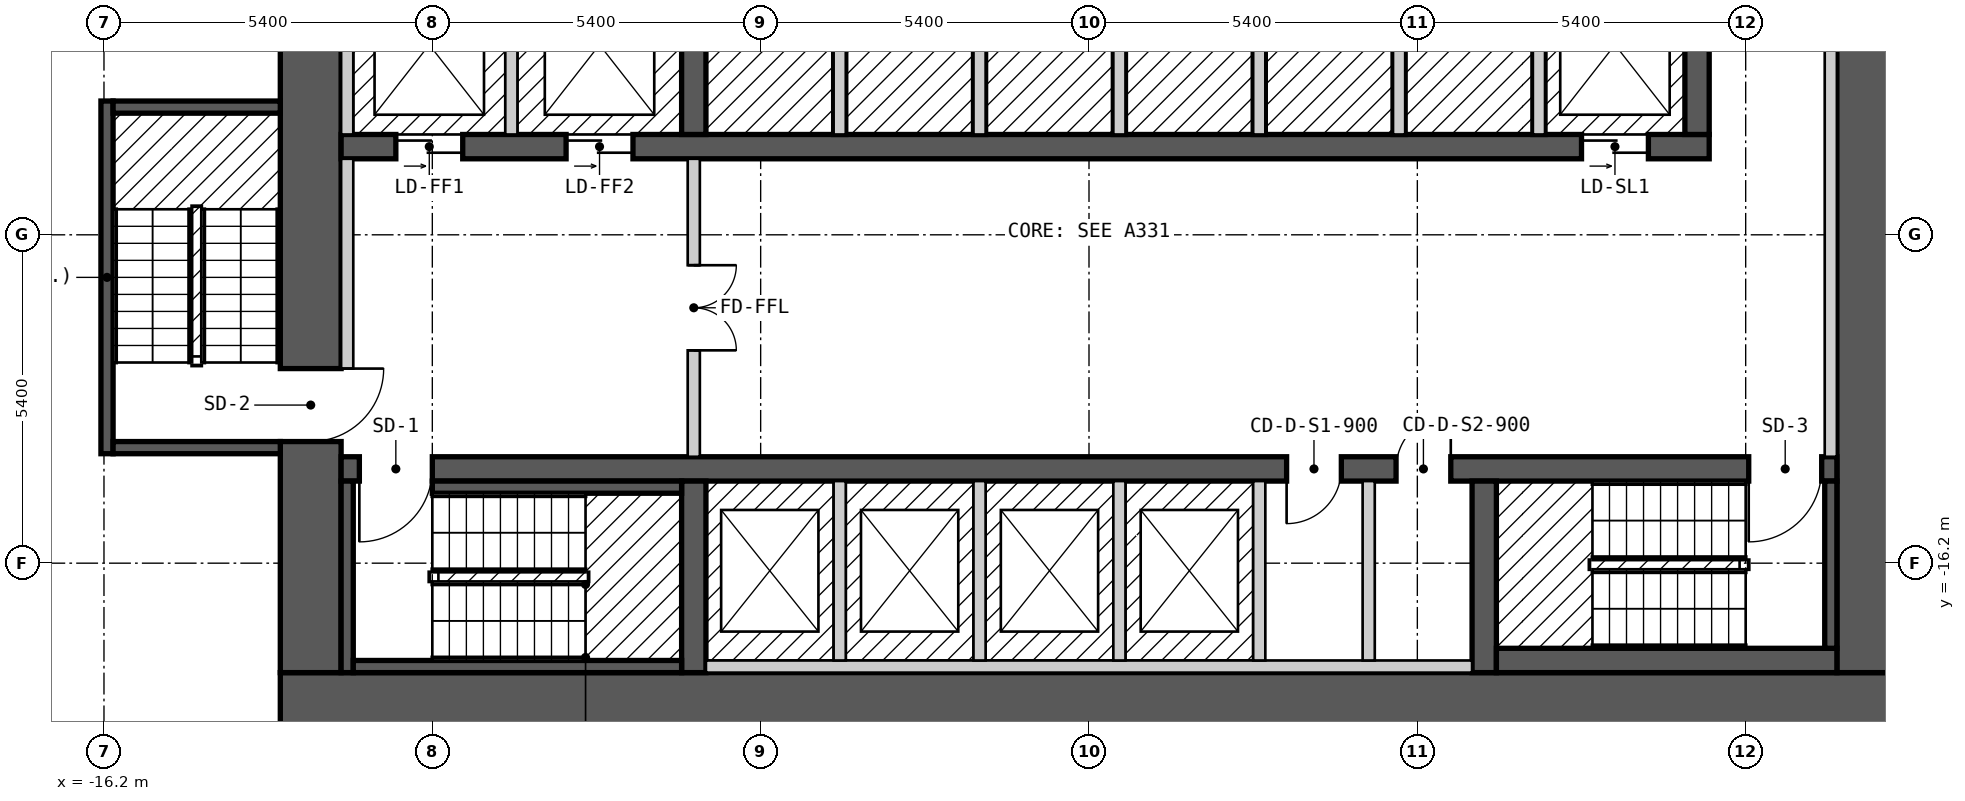
"""IFC4 building model, lengths in metres.
Left out: names, types, materials, properties, quantities, classifications, styles, units other than length and angle.
Written with IfcOpenShell. Run it as: python <this file> out.ifc"""

import sys

from ifc_helpers import new_model, si_unit, direction, frame, frame_2d, origin, place, context, subcontext, project, spatial, rectangle, extrude, element, fill, save


model = new_model("IFC4")
c1 = context("Model", 3, precision=1e-05, world=origin(), true_north=direction((0.0, 1.0)))
c2 = subcontext(c1, "Body", "Model", "MODEL_VIEW")
j1 = project(units=[si_unit("LENGTHUNIT", "METRE"), si_unit("PLANEANGLEUNIT", "RADIAN")], contexts=[c1])
p1 = place(None, origin())
s1 = spatial("IfcSite", under=j1, at=p1, CompositionType="ELEMENT")
p2 = place(p1, origin())
s2 = spatial("IfcBuilding", under=s1, at=p2, CompositionType="ELEMENT")
p3 = place(p2, frame((0.0, 0.0, 108.0)))
s3 = spatial("IfcBuildingStorey", under=s2, at=p3, CompositionType="ELEMENT", Elevation=108.0)
p4 = place(p3, frame((-13.3, -18.5, 0.0), z_axis=(0.0, 0.0, 1.0), x_axis=(1.0, 0.0, 0.0)))
e1 = element("IfcWall", 1, at=p4, inside=s3, PredefinedType="SHEAR", context=c2, shape_type="SweptSolid", body=[
    extrude(rectangle(XDim=26.6, YDim=1.0, at=frame_2d((13.3, 0.0))), origin(), (0.0, 0.0, 1.0), 2.6),
])
p5 = place(p3, frame((-12.8, -18.0, 0.0), z_axis=(0.0, 0.0, 1.0), x_axis=(0.0, 1.0, 0.0)))
e2 = element("IfcWall", 2, at=p5, inside=s3, PredefinedType="SHEAR", context=c2, shape_type="SweptSolid", body=[
    extrude(rectangle(XDim=12.0, YDim=1.0, at=frame_2d((6.0, 0.0))), origin(), (0.0, 0.0, 1.0), 2.6),
])
p6 = place(p5, frame((3.8, 0.0, 0.0)))
e3 = element("IfcOpeningElement", 3, at=p6, cuts=e2, PredefinedType="OPENING", context=c2, shape_type="SweptSolid", body=[
    extrude(rectangle(XDim=1.2, YDim=2.1, at=frame_2d((0.6, 1.05))), frame((0.0, 0.51, 0.0), z_axis=(0.0, -1.0, 0.0), x_axis=(1.0, 0.0, 0.0)), (0.0, 0.0, 1.0), 1.02),
])
p7 = place(p3, frame((12.8, -18.0, 0.0), z_axis=(0.0, 0.0, 1.0), x_axis=(0.0, 1.0, 0.0)))
e4 = element("IfcWall", 4, at=p7, inside=s3, PredefinedType="SHEAR", context=c2, shape_type="SweptSolid", body=[
    extrude(rectangle(XDim=12.0, YDim=1.0, at=frame_2d((6.0, 0.0))), origin(), (0.0, 0.0, 1.0), 2.6),
])
p8 = place(p3, frame((-12.3, -14.65, 0.0), z_axis=(0.0, 0.0, 1.0), x_axis=(1.0, 0.0, 0.0)))
e5 = element("IfcWall", 5, at=p8, inside=s3, PredefinedType="SHEAR", context=c2, shape_type="SweptSolid", body=[
    extrude(rectangle(XDim=24.6, YDim=0.4, at=frame_2d((12.3, 0.0))), origin(), (0.0, 0.0, 1.0), 2.6),
])
p9 = place(p8, frame((1.5, 0.0, 0.0), z_axis=(0.0, 0.0, 1.0), x_axis=(-1.0, 0.0, 0.0)))
e6 = element("IfcOpeningElement", 6, at=p9, cuts=e5, PredefinedType="OPENING", context=c2, shape_type="SweptSolid", body=[
    extrude(rectangle(XDim=1.2, YDim=2.1, at=frame_2d((0.6, 1.05))), frame((0.0, 0.21, 0.0), z_axis=(0.0, -1.0, 0.0), x_axis=(1.0, 0.0, 0.0)), (0.0, 0.0, 1.0), 0.42),
])
p10 = place(p8, frame((24.35, 0.0, 0.0), z_axis=(0.0, 0.0, 1.0), x_axis=(-1.0, 0.0, 0.0)))
e7 = element("IfcOpeningElement", 7, at=p10, cuts=e5, PredefinedType="OPENING", context=c2, shape_type="SweptSolid", body=[
    extrude(rectangle(XDim=1.2, YDim=2.1, at=frame_2d((0.6, 1.05))), frame((0.0, 0.21, 0.0), z_axis=(0.0, -1.0, 0.0), x_axis=(1.0, 0.0, 0.0)), (0.0, 0.0, 1.0), 0.42),
])
p11 = place(p8, frame((16.45, 0.0, 0.0), z_axis=(0.0, 0.0, 1.0), x_axis=(-1.0, 0.0, 0.0)))
e8 = element("IfcOpeningElement", 8, at=p11, cuts=e5, PredefinedType="OPENING", context=c2, shape_type="SweptSolid", body=[
    extrude(rectangle(XDim=0.9, YDim=2.1, at=frame_2d((0.45, 1.05))), frame((0.0, 0.21, 0.0), z_axis=(0.0, -1.0, 0.0), x_axis=(1.0, 0.0, 0.0)), (0.0, 0.0, 1.0), 0.42),
])
p12 = place(p8, frame((18.25, 0.0, 0.0), z_axis=(0.0, 0.0, 1.0), x_axis=(-1.0, 0.0, 0.0)))
e9 = element("IfcOpeningElement", 9, at=p12, cuts=e5, PredefinedType="OPENING", context=c2, shape_type="SweptSolid", body=[
    extrude(rectangle(XDim=0.9, YDim=2.1, at=frame_2d((0.45, 1.05))), frame((0.0, 0.21, 0.0), z_axis=(0.0, -1.0, 0.0), x_axis=(1.0, 0.0, 0.0)), (0.0, 0.0, 1.0), 0.42),
])
p13 = place(p3, frame((-12.3, -9.35, 0.0), z_axis=(0.0, 0.0, 1.0), x_axis=(1.0, 0.0, 0.0)))
e10 = element("IfcWall", 10, at=p13, inside=s3, PredefinedType="SHEAR", context=c2, shape_type="SweptSolid", body=[
    extrude(rectangle(XDim=22.5, YDim=0.4, at=frame_2d((11.25, 0.0))), origin(), (0.0, 0.0, 1.0), 2.6),
])
p14 = place(p13, frame((0.9, 0.0, 0.0)))
e11 = element("IfcOpeningElement", 11, at=p14, cuts=e10, PredefinedType="OPENING", context=c2, shape_type="SweptSolid", body=[
    extrude(rectangle(XDim=1.1, YDim=2.1, at=frame_2d((0.55, 1.05))), frame((0.0, 0.21, 0.0), z_axis=(0.0, -1.0, 0.0), x_axis=(1.0, 0.0, 0.0)), (0.0, 0.0, 1.0), 0.42),
])
p15 = place(p13, frame((3.7, 0.0, 0.0)))
e12 = element("IfcOpeningElement", 12, at=p15, cuts=e10, PredefinedType="OPENING", context=c2, shape_type="SweptSolid", body=[
    extrude(rectangle(XDim=1.1, YDim=2.1, at=frame_2d((0.55, 1.05))), frame((0.0, 0.21, 0.0), z_axis=(0.0, -1.0, 0.0), x_axis=(1.0, 0.0, 0.0)), (0.0, 0.0, 1.0), 0.42),
])
p16 = place(p13, frame((20.4, 0.0, 0.0)))
e13 = element("IfcOpeningElement", 13, at=p16, cuts=e10, PredefinedType="OPENING", context=c2, shape_type="SweptSolid", body=[
    extrude(rectangle(XDim=1.1, YDim=2.1, at=frame_2d((0.55, 1.05))), frame((0.0, 0.21, 0.0), z_axis=(0.0, -1.0, 0.0), x_axis=(1.0, 0.0, 0.0)), (0.0, 0.0, 1.0), 0.42),
])
for number, where, z_axis, x_axis in (
    (14, (-6.5, -18.0, 0.0), (0.0, 0.0, 1.0), (0.0, 1.0, 0.0)),
    (15, (6.5, -18.0, 0.0), (0.0, 0.0, 1.0), (0.0, 1.0, 0.0)),
    (16, (-6.5, -9.15, 0.0), (0.0, 0.0, 1.0), (0.0, 1.0, 0.0)),
    (17, (10.0, -9.15, 0.0), (0.0, 0.0, 1.0), (0.0, 1.0, 0.0)),
):
    element("IfcWall", number, at=place(p3, frame(where, z_axis=z_axis, x_axis=x_axis)), inside=s3, PredefinedType="SHEAR", context=c2, shape_type="SweptSolid", body=[
        extrude(rectangle(XDim=3.15, YDim=0.4, at=frame_2d((1.575, 0.0))), origin(), (0.0, 0.0, 1.0), 2.6),
    ])
p17 = place(p3, frame((-16.15, -14.4, 0.0), z_axis=(0.0, 0.0, 1.0), x_axis=(0.0, 1.0, 0.0)))
e18 = element("IfcWall", 18, at=p17, inside=s3, PredefinedType="SOLIDWALL", context=c2, shape_type="SweptSolid", body=[
    extrude(rectangle(XDim=5.8, YDim=0.2, at=frame_2d((2.9, 0.0))), origin(), (0.0, 0.0, 1.0), 2.6),
])
for number, where, z_axis, x_axis in (
    (19, (-16.05, -14.3, 0.0), (0.0, 0.0, 1.0), (1.0, 0.0, 0.0)),
    (20, (-16.05, -8.7, 0.0), (0.0, 0.0, 1.0), (1.0, 0.0, 0.0)),
):
    element("IfcWall", number, at=place(p3, frame(where, z_axis=z_axis, x_axis=x_axis)), inside=s3, PredefinedType="SOLIDWALL", context=c2, shape_type="SweptSolid", body=[
        extrude(rectangle(XDim=2.75, YDim=0.2, at=frame_2d((1.375, 0.0))), origin(), (0.0, 0.0, 1.0), 2.6),
    ])
p18 = place(p3, frame((-12.2, -18.0, 0.0), z_axis=(0.0, 0.0, 1.0), x_axis=(0.0, 1.0, 0.0)))
e21 = element("IfcWall", 21, at=p18, inside=s3, PredefinedType="SOLIDWALL", context=c2, shape_type="SweptSolid", body=[
    extrude(rectangle(XDim=3.15, YDim=0.2, at=frame_2d((1.575, 0.0))), origin(), (0.0, 0.0, 1.0), 2.6),
])
p19 = place(p3, frame((-12.2, -13.0, 0.0), z_axis=(0.0, 0.0, 1.0), x_axis=(0.0, 1.0, 0.0)))
e22 = element("IfcWall", 22, at=p19, inside=s3, PredefinedType="PARTITIONING", context=c2, shape_type="SweptSolid", body=[
    extrude(rectangle(XDim=3.45, YDim=0.2, at=frame_2d((1.725, 0.0))), origin(), (0.0, 0.0, 1.0), 2.6),
])
p20 = place(p3, frame((-12.2, -9.15, 0.0), z_axis=(0.0, 0.0, 1.0), x_axis=(0.0, 1.0, 0.0)))
e23 = element("IfcWall", 23, at=p20, inside=s3, PredefinedType="SOLIDWALL", context=c2, shape_type="SweptSolid", body=[
    extrude(rectangle(XDim=3.15, YDim=0.2, at=frame_2d((1.575, 0.0))), origin(), (0.0, 0.0, 1.0), 2.6),
])
p21 = place(p3, frame((-12.1, -17.9, 0.0), z_axis=(0.0, 0.0, 1.0), x_axis=(1.0, 0.0, 0.0)))
e24 = element("IfcWall", 24, at=p21, inside=s3, PredefinedType="SOLIDWALL", context=c2, shape_type="SweptSolid", body=[
    extrude(rectangle(XDim=5.4, YDim=0.2, at=frame_2d((2.7, 0.0))), origin(), (0.0, 0.0, 1.0), 2.6),
])
p22 = place(p3, frame((-10.8, -14.95, 0.0), z_axis=(0.0, 0.0, 1.0), x_axis=(1.0, 0.0, 0.0)))
e25 = element("IfcWall", 25, at=p22, inside=s3, PredefinedType="SOLIDWALL", context=c2, shape_type="SweptSolid", body=[
    extrude(rectangle(XDim=4.1, YDim=0.2, at=frame_2d((2.05, 0.0))), origin(), (0.0, 0.0, 1.0), 2.6),
])
p23 = place(p3, frame((-9.5, -9.15, 0.0), z_axis=(0.0, 0.0, 1.0), x_axis=(0.0, 1.0, 0.0)))
e26 = element("IfcWall", 26, at=p23, inside=s3, PredefinedType="SOLIDWALL", context=c2, shape_type="SweptSolid", body=[
    extrude(rectangle(XDim=2.95, YDim=0.2, at=frame_2d((1.475, 0.0))), origin(), (0.0, 0.0, 1.0), 2.6),
])
p24 = place(p3, frame((-6.5, -14.45, 0.0), z_axis=(0.0, 0.0, 1.0), x_axis=(0.0, 1.0, 0.0)))
e27 = element("IfcWall", 27, at=p24, inside=s3, PredefinedType="PARTITIONING", context=c2, shape_type="SweptSolid", body=[
    extrude(rectangle(XDim=4.9, YDim=0.2, at=frame_2d((2.45, 0.0))), origin(), (0.0, 0.0, 1.0), 2.6),
])
p25 = place(p24, frame((3.15, 0.0, 0.0), z_axis=(0.0, 0.0, 1.0), x_axis=(-1.0, 0.0, 0.0)))
e28 = element("IfcOpeningElement", 28, at=p25, cuts=e27, PredefinedType="OPENING", context=c2, shape_type="SweptSolid", body=[
    extrude(rectangle(XDim=1.4, YDim=2.1, at=frame_2d((0.7, 1.05))), frame((0.0, 0.11, 0.0), z_axis=(0.0, -1.0, 0.0), x_axis=(1.0, 0.0, 0.0)), (0.0, 0.0, 1.0), 0.22),
])
p26 = place(p3, frame((-6.3, -17.9, 0.0), z_axis=(0.0, 0.0, 1.0), x_axis=(1.0, 0.0, 0.0)))
e29 = element("IfcWall", 29, at=p26, inside=s3, PredefinedType="SOLIDWALL", context=c2, shape_type="SweptSolid", body=[
    extrude(rectangle(XDim=12.6, YDim=0.2, at=frame_2d((6.3, 0.0))), origin(), (0.0, 0.0, 1.0), 2.6),
])
p27 = place(p3, frame((-4.1, -17.8, 0.0), z_axis=(0.0, 0.0, 1.0), x_axis=(0.0, 1.0, 0.0)))
e30 = element("IfcWall", 30, at=p27, inside=s3, PredefinedType="SOLIDWALL", context=c2, shape_type="SweptSolid", body=[
    extrude(rectangle(XDim=2.95, YDim=0.2, at=frame_2d((1.475, 0.0))), origin(), (0.0, 0.0, 1.0), 2.6),
])
p28 = place(p3, frame((-4.1, -9.15, 0.0), z_axis=(0.0, 0.0, 1.0), x_axis=(0.0, 1.0, 0.0)))
e31 = element("IfcWall", 31, at=p28, inside=s3, PredefinedType="SOLIDWALL", context=c2, shape_type="SweptSolid", body=[
    extrude(rectangle(XDim=2.95, YDim=0.2, at=frame_2d((1.475, 0.0))), origin(), (0.0, 0.0, 1.0), 1.4),
])
p29 = place(p3, frame((-4.1, -9.15, 1.7), z_axis=(0.0, 0.0, 1.0), x_axis=(0.0, 1.0, 0.0)))
e32 = element("IfcWall", 32, at=p29, inside=s3, PredefinedType="SOLIDWALL", context=c2, shape_type="SweptSolid", body=[
    extrude(rectangle(XDim=2.95, YDim=0.2, at=frame_2d((1.475, 0.0))), origin(), (0.0, 0.0, 1.0), 0.9),
])
p30 = place(p3, frame((-1.8, -17.8, 0.0), z_axis=(0.0, 0.0, 1.0), x_axis=(0.0, 1.0, 0.0)))
e33 = element("IfcWall", 33, at=p30, inside=s3, PredefinedType="SOLIDWALL", context=c2, shape_type="SweptSolid", body=[
    extrude(rectangle(XDim=2.95, YDim=0.2, at=frame_2d((1.475, 0.0))), origin(), (0.0, 0.0, 1.0), 2.6),
])
p31 = place(p3, frame((-1.8, -9.15, 0.0), z_axis=(0.0, 0.0, 1.0), x_axis=(0.0, 1.0, 0.0)))
e34 = element("IfcWall", 34, at=p31, inside=s3, PredefinedType="SOLIDWALL", context=c2, shape_type="SweptSolid", body=[
    extrude(rectangle(XDim=2.95, YDim=0.2, at=frame_2d((1.475, 0.0))), origin(), (0.0, 0.0, 1.0), 1.4),
])
p32 = place(p3, frame((-1.8, -9.15, 1.7), z_axis=(0.0, 0.0, 1.0), x_axis=(0.0, 1.0, 0.0)))
e35 = element("IfcWall", 35, at=p32, inside=s3, PredefinedType="SOLIDWALL", context=c2, shape_type="SweptSolid", body=[
    extrude(rectangle(XDim=2.95, YDim=0.2, at=frame_2d((1.475, 0.0))), origin(), (0.0, 0.0, 1.0), 0.9),
])
p33 = place(p3, frame((0.5, -17.8, 0.0), z_axis=(0.0, 0.0, 1.0), x_axis=(0.0, 1.0, 0.0)))
e36 = element("IfcWall", 36, at=p33, inside=s3, PredefinedType="SOLIDWALL", context=c2, shape_type="SweptSolid", body=[
    extrude(rectangle(XDim=2.95, YDim=0.2, at=frame_2d((1.475, 0.0))), origin(), (0.0, 0.0, 1.0), 2.6),
])
p34 = place(p3, frame((0.5, -9.15, 0.0), z_axis=(0.0, 0.0, 1.0), x_axis=(0.0, 1.0, 0.0)))
e37 = element("IfcWall", 37, at=p34, inside=s3, PredefinedType="SOLIDWALL", context=c2, shape_type="SweptSolid", body=[
    extrude(rectangle(XDim=2.95, YDim=0.2, at=frame_2d((1.475, 0.0))), origin(), (0.0, 0.0, 1.0), 1.4),
])
p35 = place(p3, frame((0.5, -9.15, 1.7), z_axis=(0.0, 0.0, 1.0), x_axis=(0.0, 1.0, 0.0)))
e38 = element("IfcWall", 38, at=p35, inside=s3, PredefinedType="SOLIDWALL", context=c2, shape_type="SweptSolid", body=[
    extrude(rectangle(XDim=2.95, YDim=0.2, at=frame_2d((1.475, 0.0))), origin(), (0.0, 0.0, 1.0), 0.9),
])
p36 = place(p3, frame((2.8, -17.8, 0.0), z_axis=(0.0, 0.0, 1.0), x_axis=(0.0, 1.0, 0.0)))
e39 = element("IfcWall", 39, at=p36, inside=s3, PredefinedType="SOLIDWALL", context=c2, shape_type="SweptSolid", body=[
    extrude(rectangle(XDim=2.95, YDim=0.2, at=frame_2d((1.475, 0.0))), origin(), (0.0, 0.0, 1.0), 2.6),
])
p37 = place(p3, frame((2.8, -9.15, 0.0), z_axis=(0.0, 0.0, 1.0), x_axis=(0.0, 1.0, 0.0)))
e40 = element("IfcWall", 40, at=p37, inside=s3, PredefinedType="SOLIDWALL", context=c2, shape_type="SweptSolid", body=[
    extrude(rectangle(XDim=2.95, YDim=0.2, at=frame_2d((1.475, 0.0))), origin(), (0.0, 0.0, 1.0), 1.4),
])
p38 = place(p3, frame((2.8, -9.15, 1.7), z_axis=(0.0, 0.0, 1.0), x_axis=(0.0, 1.0, 0.0)))
e41 = element("IfcWall", 41, at=p38, inside=s3, PredefinedType="SOLIDWALL", context=c2, shape_type="SweptSolid", body=[
    extrude(rectangle(XDim=2.95, YDim=0.2, at=frame_2d((1.475, 0.0))), origin(), (0.0, 0.0, 1.0), 0.9),
])
p39 = place(p3, frame((4.6, -17.8, 0.0), z_axis=(0.0, 0.0, 1.0), x_axis=(0.0, 1.0, 0.0)))
e42 = element("IfcWall", 42, at=p39, inside=s3, PredefinedType="PARTITIONING", context=c2, shape_type="SweptSolid", body=[
    extrude(rectangle(XDim=2.95, YDim=0.2, at=frame_2d((1.475, 0.0))), origin(), (0.0, 0.0, 1.0), 2.6),
])
p40 = place(p3, frame((5.1, -9.15, 0.0), z_axis=(0.0, 0.0, 1.0), x_axis=(0.0, 1.0, 0.0)))
e43 = element("IfcWall", 43, at=p40, inside=s3, PredefinedType="SOLIDWALL", context=c2, shape_type="SweptSolid", body=[
    extrude(rectangle(XDim=2.95, YDim=0.2, at=frame_2d((1.475, 0.0))), origin(), (0.0, 0.0, 1.0), 1.4),
])
p41 = place(p3, frame((5.1, -9.15, 1.7), z_axis=(0.0, 0.0, 1.0), x_axis=(0.0, 1.0, 0.0)))
e44 = element("IfcWall", 44, at=p41, inside=s3, PredefinedType="SOLIDWALL", context=c2, shape_type="SweptSolid", body=[
    extrude(rectangle(XDim=2.95, YDim=0.2, at=frame_2d((1.475, 0.0))), origin(), (0.0, 0.0, 1.0), 0.9),
])
p42 = place(p3, frame((6.7, -17.8, 0.0), z_axis=(0.0, 0.0, 1.0), x_axis=(1.0, 0.0, 0.0)))
e45 = element("IfcWall", 45, at=p42, inside=s3, PredefinedType="SOLIDWALL", context=c2, shape_type="SweptSolid", body=[
    extrude(rectangle(XDim=5.6, YDim=0.4, at=frame_2d((2.8, 0.0))), origin(), (0.0, 0.0, 1.0), 2.6),
])
p43 = place(p3, frame((7.4, -9.15, 0.0), z_axis=(0.0, 0.0, 1.0), x_axis=(0.0, 1.0, 0.0)))
e46 = element("IfcWall", 46, at=p43, inside=s3, PredefinedType="SOLIDWALL", context=c2, shape_type="SweptSolid", body=[
    extrude(rectangle(XDim=2.95, YDim=0.2, at=frame_2d((1.475, 0.0))), origin(), (0.0, 0.0, 1.0), 1.4),
])
p44 = place(p3, frame((7.4, -9.15, 1.7), z_axis=(0.0, 0.0, 1.0), x_axis=(0.0, 1.0, 0.0)))
e47 = element("IfcWall", 47, at=p44, inside=s3, PredefinedType="SOLIDWALL", context=c2, shape_type="SweptSolid", body=[
    extrude(rectangle(XDim=2.95, YDim=0.2, at=frame_2d((1.475, 0.0))), origin(), (0.0, 0.0, 1.0), 0.9),
])
p45 = place(p3, frame((12.2, -17.6, 0.0), z_axis=(0.0, 0.0, 1.0), x_axis=(0.0, 1.0, 0.0)))
e48 = element("IfcWall", 48, at=p45, inside=s3, PredefinedType="SOLIDWALL", context=c2, shape_type="SweptSolid", body=[
    extrude(rectangle(XDim=2.75, YDim=0.2, at=frame_2d((1.375, 0.0))), origin(), (0.0, 0.0, 1.0), 2.6),
])
p46 = place(p3, frame((12.2, -14.45, 0.0), z_axis=(0.0, 0.0, 1.0), x_axis=(0.0, 1.0, 0.0)))
e49 = element("IfcWall", 49, at=p46, inside=s3, PredefinedType="PARTITIONING", context=c2, shape_type="SweptSolid", body=[
    extrude(rectangle(XDim=8.25, YDim=0.2, at=frame_2d((4.125, 0.0))), origin(), (0.0, 0.0, 1.0), 2.6),
])
p47 = place(p14, origin())
e50 = element("IfcDoor", 50, at=p47, inside=s3, OperationType="DOUBLE_DOOR_SLIDING", PredefinedType="DOOR", context=c2, shape_type="SweptSolid", body=[
    extrude(rectangle(XDim=1.1, YDim=2.1, at=frame_2d((0.55, 1.05))), frame((0.0, 0.025, 0.0), z_axis=(0.0, -1.0, 0.0), x_axis=(1.0, 0.0, 0.0)), (0.0, 0.0, 1.0), 0.05),
])
fill(e11, e50)
p48 = place(p15, origin())
e51 = element("IfcDoor", 51, at=p48, inside=s3, OperationType="DOUBLE_DOOR_SLIDING", PredefinedType="DOOR", context=c2, shape_type="SweptSolid", body=[
    extrude(rectangle(XDim=1.1, YDim=2.1, at=frame_2d((0.55, 1.05))), frame((0.0, 0.025, 0.0), z_axis=(0.0, -1.0, 0.0), x_axis=(1.0, 0.0, 0.0)), (0.0, 0.0, 1.0), 0.05),
])
fill(e12, e51)
p49 = place(p16, origin())
e52 = element("IfcDoor", 52, at=p49, inside=s3, OperationType="DOUBLE_DOOR_SLIDING", PredefinedType="DOOR", context=c2, shape_type="SweptSolid", body=[
    extrude(rectangle(XDim=1.1, YDim=2.1, at=frame_2d((0.55, 1.05))), frame((0.0, 0.025, 0.0), z_axis=(0.0, -1.0, 0.0), x_axis=(1.0, 0.0, 0.0)), (0.0, 0.0, 1.0), 0.05),
])
fill(e13, e52)
p50 = place(p9, origin())
e53 = element("IfcDoor", 53, at=p50, inside=s3, OperationType="SINGLE_SWING_RIGHT", PredefinedType="DOOR", context=c2, shape_type="SweptSolid", body=[
    extrude(rectangle(XDim=1.2, YDim=2.1, at=frame_2d((0.6, 1.05))), frame((0.0, 0.025, 0.0), z_axis=(0.0, -1.0, 0.0), x_axis=(1.0, 0.0, 0.0)), (0.0, 0.0, 1.0), 0.05),
])
fill(e6, e53)
p51 = place(p10, origin())
e54 = element("IfcDoor", 54, at=p51, inside=s3, OperationType="SINGLE_SWING_RIGHT", PredefinedType="DOOR", context=c2, shape_type="SweptSolid", body=[
    extrude(rectangle(XDim=1.2, YDim=2.1, at=frame_2d((0.6, 1.05))), frame((0.0, 0.025, 0.0), z_axis=(0.0, -1.0, 0.0), x_axis=(1.0, 0.0, 0.0)), (0.0, 0.0, 1.0), 0.05),
])
fill(e7, e54)
p52 = place(p6, origin())
e55 = element("IfcDoor", 55, at=p52, inside=s3, OperationType="SINGLE_SWING_RIGHT", PredefinedType="DOOR", context=c2, shape_type="SweptSolid", body=[
    extrude(rectangle(XDim=1.2, YDim=2.1, at=frame_2d((0.6, 1.05))), frame((0.0, 0.025, 0.0), z_axis=(0.0, -1.0, 0.0), x_axis=(1.0, 0.0, 0.0)), (0.0, 0.0, 1.0), 0.05),
])
fill(e3, e55)
p53 = place(p25, origin())
e56 = element("IfcDoor", 56, at=p53, inside=s3, OperationType="DOUBLE_DOOR_SINGLE_SWING", PredefinedType="DOOR", context=c2, shape_type="SweptSolid", body=[
    extrude(rectangle(XDim=1.4, YDim=2.1, at=frame_2d((0.7, 1.05))), frame((0.0, 0.025, 0.0), z_axis=(0.0, -1.0, 0.0), x_axis=(1.0, 0.0, 0.0)), (0.0, 0.0, 1.0), 0.05),
])
fill(e28, e56)
p54 = place(p11, origin())
e57 = element("IfcDoor", 57, at=p54, inside=s3, OperationType="SINGLE_SWING_RIGHT", PredefinedType="DOOR", context=c2, shape_type="SweptSolid", body=[
    extrude(rectangle(XDim=0.9, YDim=2.1, at=frame_2d((0.45, 1.05))), frame((0.0, 0.025, 0.0), z_axis=(0.0, -1.0, 0.0), x_axis=(1.0, 0.0, 0.0)), (0.0, 0.0, 1.0), 0.05),
])
fill(e8, e57)
p55 = place(p12, origin())
e58 = element("IfcDoor", 58, at=p55, inside=s3, OperationType="SINGLE_SWING_LEFT", PredefinedType="DOOR", context=c2, shape_type="SweptSolid", body=[
    extrude(rectangle(XDim=0.9, YDim=2.1, at=frame_2d((0.45, 1.05))), frame((0.0, 0.025, 0.0), z_axis=(0.0, -1.0, 0.0), x_axis=(1.0, 0.0, 0.0)), (0.0, 0.0, 1.0), 0.05),
])
fill(e9, e58)
save(model, sys.argv[1])
